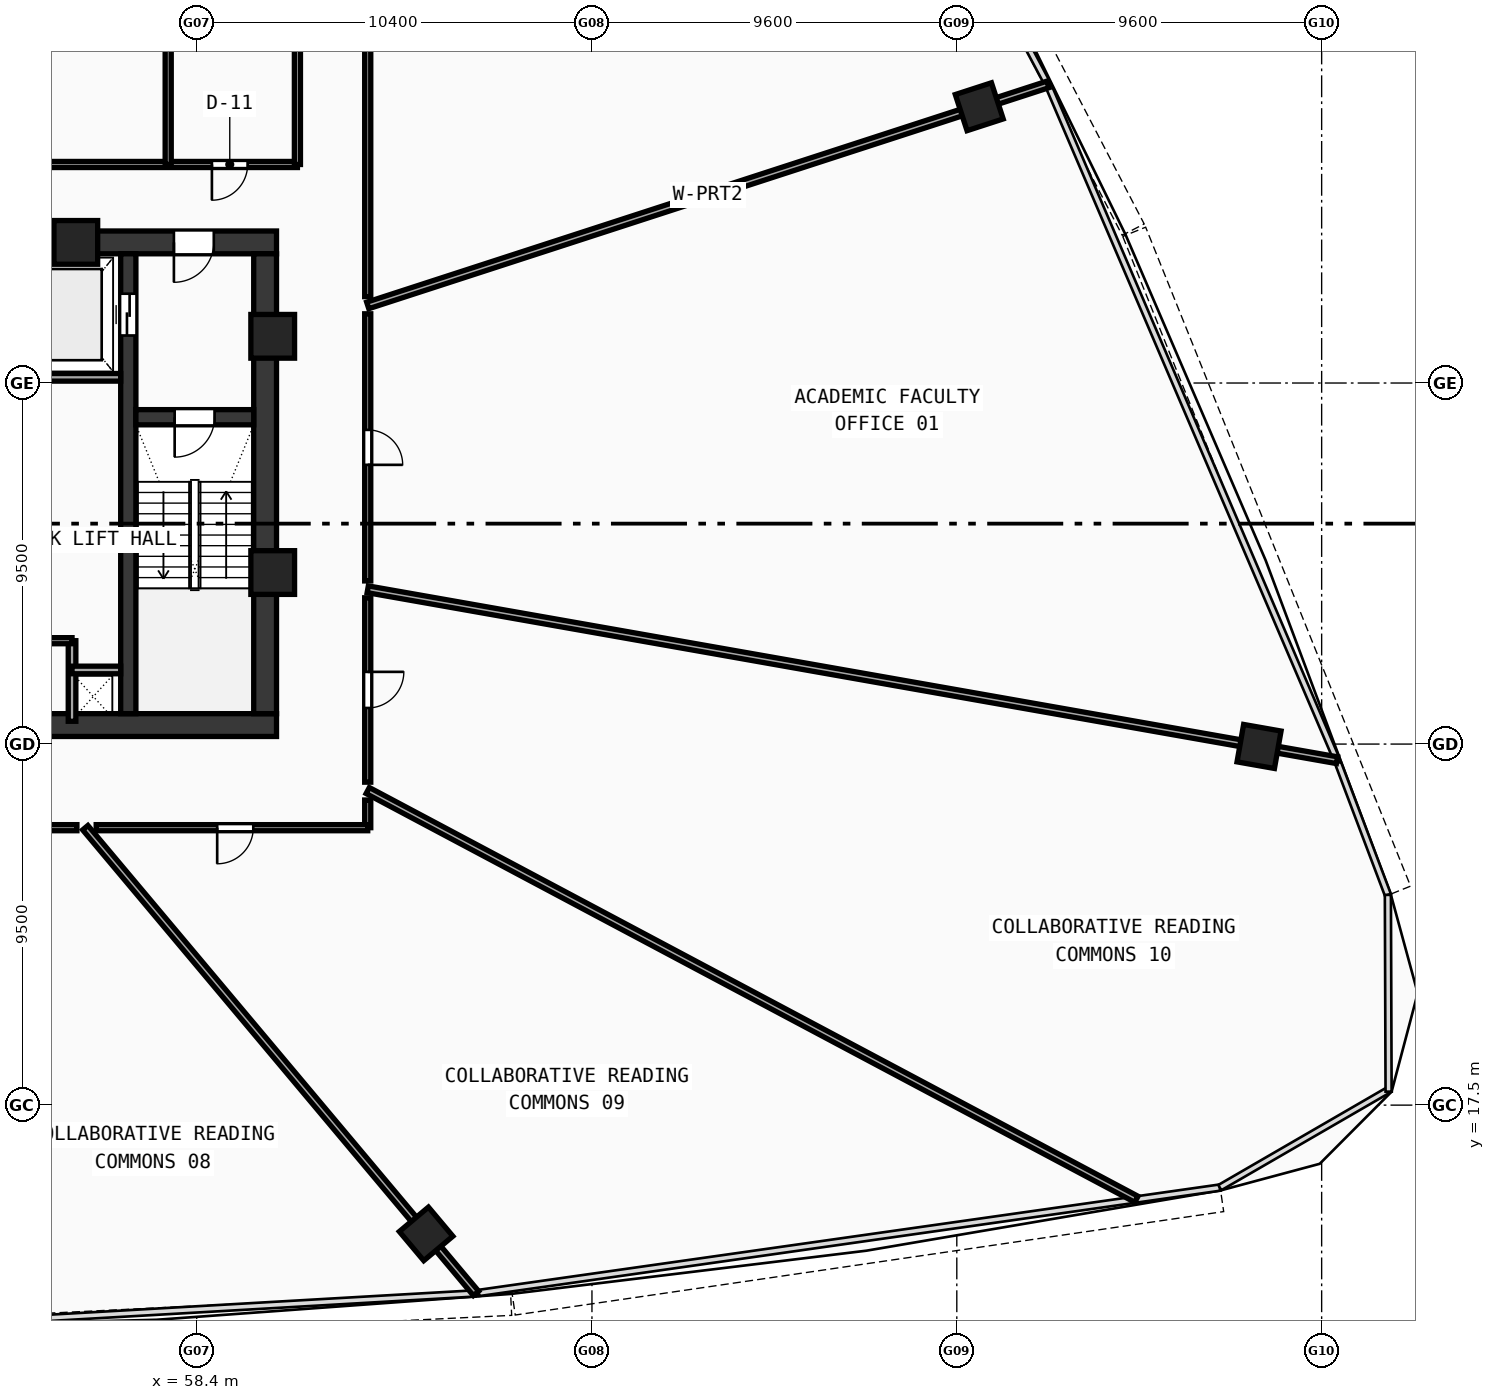
"""IFC4 building model, lengths in metres.
Left out: names, types, materials, properties, quantities, classifications, styles, units other than length and angle.
Written with IfcOpenShell. Run it as: python <this file> out.ifc"""

import sys

from ifc_helpers import new_model, si_unit, direction, frame, frame_2d, origin, origin_with_axes, origin_2d, place, context, subcontext, project, spatial, rectangle, hollow_rectangle, extrude, source, transform, mapped, element, fill, save


model = new_model("IFC4")
c1 = context("Model", 3, precision=1e-05, world=origin(), true_north=direction((0.0, 1.0)))
c2 = subcontext(c1, "Body", "Model", "MODEL_VIEW")
j1 = project(units=[si_unit("LENGTHUNIT", "METRE"), si_unit("PLANEANGLEUNIT", "RADIAN")], contexts=[c1])
p1 = place(None, origin())
s1 = spatial("IfcSite", under=j1, at=p1, CompositionType="ELEMENT")
p2 = place(p1, origin())
s2 = spatial("IfcBuilding", under=s1, at=p2, CompositionType="ELEMENT")
p3 = place(p2, frame((0.0, 0.0, 92.58)))
s3 = spatial("IfcBuildingStorey", under=s2, at=p3, CompositionType="ELEMENT", Elevation=92.58)
p4 = place(p3, frame((35.5, 27.5, 0.0), z_axis=(0.0, 0.0, 1.0), x_axis=(1.0, 0.0, 0.0)))
e1 = element("IfcWall", 1, at=p4, inside=s3, PredefinedType="SHEAR", context=c2, shape_type="SweptSolid", body=[
    extrude(rectangle(XDim=25.0, YDim=0.6, at=frame_2d((12.5, 0.0))), origin(), (0.0, 0.0, 1.0), 3.54),
])
p5 = place(p3, frame((49.2, 40.2, 0.0), z_axis=(0.0, 0.0, 1.0), x_axis=(1.0, 0.0, 0.0)))
e2 = element("IfcWall", 2, at=p5, inside=s3, PredefinedType="SHEAR", context=c2, shape_type="SweptSolid", body=[
    extrude(rectangle(XDim=11.3, YDim=0.6, at=frame_2d((5.65, 0.0))), origin(), (0.0, 0.0, 1.0), 3.54),
])
p6 = place(p5, frame((8.6, 0.0, 0.0)))
e3 = element("IfcOpeningElement", 3, at=p6, cuts=e2, PredefinedType="OPENING", context=c2, shape_type="SweptSolid", body=[
    extrude(rectangle(XDim=1.05, YDim=2.1, at=frame_2d((0.525, 1.05))), frame((0.0, 0.31, 0.0), z_axis=(0.0, -1.0, 0.0), x_axis=(1.0, 0.0, 0.0)), (0.0, 0.0, 1.0), 0.62),
])
p7 = place(p3, frame((60.2, 27.8, 0.0), z_axis=(0.0, 0.0, 1.0), x_axis=(0.0, 1.0, 0.0)))
e4 = element("IfcWall", 4, at=p7, inside=s3, PredefinedType="SHEAR", context=c2, shape_type="SweptSolid", body=[
    extrude(rectangle(XDim=12.1, YDim=0.6, at=frame_2d((6.05, 0.0))), origin(), (0.0, 0.0, 1.0), 3.54),
])
p8 = place(p3, frame((56.6, 27.8, 0.0), z_axis=(0.0, 0.0, 1.0), x_axis=(0.0, 1.0, 0.0)))
e5 = element("IfcWall", 5, at=p8, inside=s3, PredefinedType="SHEAR", context=c2, shape_type="SweptSolid", body=[
    extrude(rectangle(XDim=12.1, YDim=0.4, at=frame_2d((6.05, 0.0))), origin(), (0.0, 0.0, 1.0), 3.54),
])
p9 = place(p8, frame((9.95, 0.0, 0.0)))
e6 = element("IfcOpeningElement", 6, at=p9, cuts=e5, PredefinedType="OPENING", context=c2, shape_type="SweptSolid", body=[
    extrude(rectangle(XDim=1.1, YDim=2.1, at=frame_2d((0.55, 1.05))), frame((0.0, 0.21, 0.0), z_axis=(0.0, -1.0, 0.0), x_axis=(1.0, 0.0, 0.0)), (0.0, 0.0, 1.0), 0.42),
])
p10 = place(p3, frame((56.8, 35.6, 0.0), z_axis=(0.0, 0.0, 1.0), x_axis=(1.0, 0.0, 0.0)))
e7 = element("IfcWall", 7, at=p10, inside=s3, PredefinedType="SHEAR", context=c2, shape_type="SweptSolid", body=[
    extrude(rectangle(XDim=3.1, YDim=0.4, at=frame_2d((1.55, 0.0))), origin(), (0.0, 0.0, 1.0), 3.54),
])
p11 = place(p10, frame((1.02, 0.0, 0.0)))
e8 = element("IfcOpeningElement", 8, at=p11, cuts=e7, PredefinedType="OPENING", context=c2, shape_type="SweptSolid", body=[
    extrude(rectangle(XDim=1.05, YDim=2.1, at=frame_2d((0.525, 1.05))), frame((0.0, 0.21, 0.0), z_axis=(0.0, -1.0, 0.0), x_axis=(1.0, 0.0, 0.0)), (0.0, 0.0, 1.0), 0.42),
])
m1 = source(origin(), c2, "Body", "SweptSolid", [
    extrude(hollow_rectangle(XDim=1.15, YDim=1.15, WallThickness=0.048, at=origin_2d()), origin(), (0.0, 0.0, 1.0), 3.8),
])
for number, where, z_axis, x_axis in (
    (9, (60.4, 31.513, -0.26), (0.0, 0.0, 1.0), (1.0, 0.0, 0.0)),
    (10, (60.4, 37.729, -0.26), (0.0, 0.0, 1.0), (1.0, 0.0, 0.0)),
    (11, (55.219, 40.2, -0.26), (0.0, 0.0, 1.0), (1.0, 0.0, 0.0)),
):
    element("IfcColumn", number, at=place(p3, frame(where, z_axis=z_axis, x_axis=x_axis)), inside=s3, PredefinedType="COLUMN", context=c2, shape_type="MappedRepresentation", body=[
        mapped(m1, transform((0.0, 0.0, 0.0), scale=1.0)),
    ])
m2 = source(origin(), c2, "Body", "SweptSolid", [
    extrude(hollow_rectangle(XDim=1.0, YDim=1.0, WallThickness=0.042, at=origin_2d()), origin(), (0.0, 0.0, 1.0), 3.8),
])
for number, where, z_axis, x_axis in (
    (12, (64.436, 14.112, -0.26), (0.0, 0.0, 1.0), (0.766, 0.643, 0.0)),
    (13, (86.353, 26.938, -0.26), (0.0, 0.0, 1.0), (0.174, 0.985, 0.0)),
    (14, (78.991, 43.77, -0.26), (0.0, 0.0, 1.0), (-0.309, 0.951, 0.0)),
):
    element("IfcColumn", number, at=place(p3, frame(where, z_axis=z_axis, x_axis=x_axis)), inside=s3, PredefinedType="COLUMN", context=c2, shape_type="MappedRepresentation", body=[
        mapped(m2, transform((0.0, 0.0, 0.0), scale=1.0)),
    ])
p12 = place(p3, frame((53.68, 36.65, 0.0), z_axis=(0.0, 0.0, 1.0), x_axis=(1.0, 0.0, 0.0)))
e15 = element("IfcWall", 15, at=p12, inside=s3, PredefinedType="SOLIDWALL", context=c2, shape_type="SweptSolid", body=[
    extrude(rectangle(XDim=2.72, YDim=0.2, at=frame_2d((1.36, 0.0))), origin(), (0.0, 0.0, 1.0), 3.54),
])
p13 = place(p3, frame((55.12, 27.6, 0.0), z_axis=(0.0, 0.0, 1.0), x_axis=(0.0, 1.0, 0.0)))
e16 = element("IfcWall", 16, at=p13, inside=s3, PredefinedType="SOLIDWALL", context=c2, shape_type="SweptSolid", body=[
    extrude(rectangle(XDim=2.12, YDim=0.2, at=frame_2d((1.06, 0.0))), origin(), (0.0, 0.0, 1.0), 3.54),
])
p14 = place(p3, frame((55.12, 28.95, 0.0), z_axis=(0.0, 0.0, 1.0), x_axis=(1.0, 0.0, 0.0)))
e17 = element("IfcWall", 17, at=p14, inside=s3, PredefinedType="SOLIDWALL", context=c2, shape_type="SweptSolid", body=[
    extrude(rectangle(XDim=1.28, YDim=0.2, at=frame_2d((0.64, 0.0))), origin(), (0.0, 0.0, 1.0), 3.54),
])
p15 = place(p3, frame((51.05, 29.72, 0.0), z_axis=(0.0, 0.0, 1.0), x_axis=(1.0, 0.0, 0.0)))
e18 = element("IfcWall", 18, at=p15, inside=s3, PredefinedType="PARTITIONING", context=c2, shape_type="SweptSolid", body=[
    extrude(rectangle(XDim=4.07, YDim=0.16, at=frame_2d((2.035, 0.0))), origin(), (0.0, 0.0, 1.0), 3.54),
])
p16 = place(p15, frame((0.5, 0.0, 0.0)))
e19 = element("IfcOpeningElement", 19, at=p16, cuts=e18, PredefinedType="OPENING", context=c2, shape_type="SweptSolid", body=[
    extrude(rectangle(XDim=0.9, YDim=2.1, at=frame_2d((0.45, 1.05))), frame((0.0, 0.09, 0.0), z_axis=(0.0, -1.0, 0.0), x_axis=(1.0, 0.0, 0.0)), (0.0, 0.0, 1.0), 0.18),
])
p17 = place(p3, frame((45.92, 42.25, 0.0), z_axis=(0.0, 0.0, 1.0), x_axis=(1.0, 0.0, 0.0)))
e20 = element("IfcWall", 20, at=p17, inside=s3, PredefinedType="PARTITIONING", context=c2, shape_type="SweptSolid", body=[
    extrude(rectangle(XDim=15.13, YDim=0.16, at=frame_2d((7.565, 0.0))), origin(), (0.0, 0.0, 1.0), 2.84),
])
p18 = place(p17, frame((2.1, 0.0, 0.0)))
e21 = element("IfcOpeningElement", 21, at=p18, cuts=e20, PredefinedType="OPENING", context=c2, shape_type="SweptSolid", body=[
    extrude(rectangle(XDim=0.92, YDim=2.1, at=frame_2d((0.46, 1.05))), frame((0.0, 0.09, 0.0), z_axis=(0.0, -1.0, 0.0), x_axis=(1.0, 0.0, 0.0)), (0.0, 0.0, 1.0), 0.18),
])
p19 = place(p17, frame((12.88, 0.0, 0.0)))
e22 = element("IfcOpeningElement", 22, at=p19, cuts=e20, PredefinedType="OPENING", context=c2, shape_type="SweptSolid", body=[
    extrude(rectangle(XDim=0.94, YDim=2.1, at=frame_2d((0.47, 1.05))), frame((0.0, 0.09, 0.0), z_axis=(0.0, -1.0, 0.0), x_axis=(1.0, 0.0, 0.0)), (0.0, 0.0, 1.0), 0.18),
])
p20 = place(p3, frame((61.05, 42.25, 0.0), z_axis=(0.0, 0.0, 1.0), x_axis=(0.0, 1.0, 0.0)))
e23 = element("IfcWall", 23, at=p20, inside=s3, PredefinedType="PARTITIONING", context=c2, shape_type="SweptSolid", body=[
    extrude(rectangle(XDim=9.35, YDim=0.16, at=frame_2d((4.675, 0.0))), origin(), (0.0, 0.0, 1.0), 2.84),
])
p21 = place(p3, frame((57.65, 42.25, 0.0), z_axis=(0.0, 0.0, 1.0), x_axis=(0.0, 1.0, 0.0)))
e24 = element("IfcWall", 24, at=p21, inside=s3, PredefinedType="PARTITIONING", context=c2, shape_type="SweptSolid", body=[
    extrude(rectangle(XDim=4.35, YDim=0.16, at=frame_2d((2.175, 0.0))), origin(), (0.0, 0.0, 1.0), 2.84),
])
p22 = place(p3, frame((62.9, 38.541, 0.0), z_axis=(0.0, 0.0, 1.0), x_axis=(0.951056186137, 0.309018010496, 0.0)))
e25 = element("IfcWall", 25, at=p22, inside=s3, PredefinedType="PARTITIONING", context=c2, shape_type="SweptSolid", body=[
    extrude(rectangle(XDim=18.817, YDim=0.18, at=frame_2d((9.409, 0.0))), origin(), (0.0, 0.0, 1.0), 2.84),
])
p23 = place(p3, frame((55.468, 24.8, 0.0), z_axis=(0.0, 0.0, 1.0), x_axis=(0.642790007557, -0.766042431061, 0.0)))
e26 = element("IfcWall", 26, at=p23, inside=s3, PredefinedType="PARTITIONING", context=c2, shape_type="SweptSolid", body=[
    extrude(rectangle(XDim=15.995, YDim=0.18, at=frame_2d((7.998, 0.0))), origin(), (0.0, 0.0, 1.0), 2.84),
])
p24 = place(p3, frame((62.9, 25.778, 0.0), z_axis=(0.0, 0.0, 1.0), x_axis=(0.882949939944, -0.469467148533, 0.0)))
e27 = element("IfcWall", 27, at=p24, inside=s3, PredefinedType="PARTITIONING", context=c2, shape_type="SweptSolid", body=[
    extrude(rectangle(XDim=22.908, YDim=0.18, at=frame_2d((11.454, 0.0))), origin(), (0.0, 0.0, 1.0), 2.84),
])
p25 = place(p3, frame((62.9, 31.073, 0.0), z_axis=(0.0, 0.0, 1.0), x_axis=(0.984807465584, -0.173649807743, 0.0)))
e28 = element("IfcWall", 28, at=p25, inside=s3, PredefinedType="PARTITIONING", context=c2, shape_type="SweptSolid", body=[
    extrude(rectangle(XDim=25.897, YDim=0.18, at=frame_2d((12.949, 0.0))), origin(), (0.0, 0.0, 1.0), 2.84),
])
p26 = place(p3, frame((62.9, 53.45, 0.0), z_axis=(0.0, 0.0, 1.0), x_axis=(0.0, -1.0, 0.0)))
e29 = element("IfcWall", 29, at=p26, inside=s3, PredefinedType="PARTITIONING", context=c2, shape_type="SweptSolid", body=[
    extrude(rectangle(XDim=14.677, YDim=0.16, at=frame_2d((7.339, 0.0))), origin(), (0.0, 0.0, 1.0), 2.84),
])
p27 = place(p26, frame((6.75, 0.0, 0.0)))
e30 = element("IfcOpeningElement", 30, at=p27, cuts=e29, PredefinedType="OPENING", context=c2, shape_type="SweptSolid", body=[
    extrude(rectangle(XDim=0.95, YDim=2.1, at=frame_2d((0.475, 1.05))), frame((0.0, 0.09, 0.0), z_axis=(0.0, -1.0, 0.0), x_axis=(1.0, 0.0, 0.0)), (0.0, 0.0, 1.0), 0.18),
])
p28 = place(p3, frame((62.9, 38.322, 0.0), z_axis=(0.0, 0.0, 1.0), x_axis=(0.0, -1.0, 0.0)))
e31 = element("IfcWall", 31, at=p28, inside=s3, PredefinedType="PARTITIONING", context=c2, shape_type="SweptSolid", body=[
    extrude(rectangle(XDim=7.029, YDim=0.16, at=frame_2d((3.515, 0.0))), origin(), (0.0, 0.0, 1.0), 3.54),
])
p29 = place(p28, frame((3.054, 0.0, 0.0)))
e32 = element("IfcOpeningElement", 32, at=p29, cuts=e31, PredefinedType="OPENING", context=c2, shape_type="SweptSolid", body=[
    extrude(rectangle(XDim=0.92, YDim=2.1, at=frame_2d((0.46, 1.05))), frame((0.0, 0.09, 0.0), z_axis=(0.0, -1.0, 0.0), x_axis=(1.0, 0.0, 0.0)), (0.0, 0.0, 1.0), 0.18),
])
p30 = place(p3, frame((62.9, 30.849, 0.0), z_axis=(0.0, 0.0, 1.0), x_axis=(0.0, -1.0, 0.0)))
e33 = element("IfcWall", 33, at=p30, inside=s3, PredefinedType="PARTITIONING", context=c2, shape_type="SweptSolid", body=[
    extrude(rectangle(XDim=4.852, YDim=0.16, at=frame_2d((2.426, 0.0))), origin(), (0.0, 0.0, 1.0), 3.54),
])
p31 = place(p30, frame((1.949, 0.0, 0.0)))
e34 = element("IfcOpeningElement", 34, at=p31, cuts=e33, PredefinedType="OPENING", context=c2, shape_type="SweptSolid", body=[
    extrude(rectangle(XDim=0.95, YDim=2.1, at=frame_2d((0.475, 1.05))), frame((0.0, 0.09, 0.0), z_axis=(0.0, -1.0, 0.0), x_axis=(1.0, 0.0, 0.0)), (0.0, 0.0, 1.0), 0.18),
])
p32 = place(p3, frame((62.9, 25.528, 0.0), z_axis=(0.0, 0.0, 1.0), x_axis=(0.0, -1.0, 0.0)))
e35 = element("IfcWall", 35, at=p32, inside=s3, PredefinedType="PARTITIONING", context=c2, shape_type="SweptSolid", body=[
    extrude(rectangle(XDim=0.728, YDim=0.16, at=frame_2d((0.364, 0.0))), origin(), (0.0, 0.0, 1.0), 3.54),
])
p33 = place(p3, frame((62.9, 24.8, 0.0), z_axis=(0.0, 0.0, 1.0), x_axis=(-1.0, 0.0, 0.0)))
e36 = element("IfcWall", 36, at=p33, inside=s3, PredefinedType="PARTITIONING", context=c2, shape_type="SweptSolid", body=[
    extrude(rectangle(XDim=7.145, YDim=0.16, at=frame_2d((3.572, 0.0))), origin(), (0.0, 0.0, 1.0), 3.14),
])
p34 = place(p33, frame((3.011, 0.0, 0.0)))
e37 = element("IfcOpeningElement", 37, at=p34, cuts=e36, PredefinedType="OPENING", context=c2, shape_type="SweptSolid", body=[
    extrude(rectangle(XDim=0.95, YDim=2.1, at=frame_2d((0.475, 1.05))), frame((0.0, 0.09, 0.0), z_axis=(0.0, -1.0, 0.0), x_axis=(1.0, 0.0, 0.0)), (0.0, 0.0, 1.0), 0.18),
])
p35 = place(p3, frame((55.248, 24.8, 0.0), z_axis=(0.0, 0.0, 1.0), x_axis=(-1.0, 0.0, 0.0)))
e38 = element("IfcWall", 38, at=p35, inside=s3, PredefinedType="PARTITIONING", context=c2, shape_type="SweptSolid", body=[
    extrude(rectangle(XDim=4.635, YDim=0.16, at=frame_2d((2.318, 0.0))), origin(), (0.0, 0.0, 1.0), 2.84),
])
p36 = place(p35, frame((1.847, 0.0, 0.0)))
e39 = element("IfcOpeningElement", 39, at=p36, cuts=e38, PredefinedType="OPENING", context=c2, shape_type="SweptSolid", body=[
    extrude(rectangle(XDim=0.95, YDim=2.1, at=frame_2d((0.475, 1.05))), frame((0.0, 0.09, 0.0), z_axis=(0.0, -1.0, 0.0), x_axis=(1.0, 0.0, 0.0)), (0.0, 0.0, 1.0), 0.18),
])
m3 = source(origin(), c2, "Body", "SweptSolid", [
    extrude(rectangle(XDim=1.05, YDim=2.1, at=frame_2d((0.525, 1.05))), frame((0.0, 0.025, 0.0), z_axis=(0.0, -1.0, 0.0), x_axis=(1.0, 0.0, 0.0)), (0.0, 0.0, 1.0), 0.05),
])
p37 = place(p11, frame((1.05, 0.0, 0.0), z_axis=(0.0, 0.0, 1.0), x_axis=(-1.0, 0.0, 0.0)))
e40 = element("IfcDoor", 40, at=p37, inside=s3, OperationType="SINGLE_SWING_RIGHT", PredefinedType="DOOR", context=c2, shape_type="MappedRepresentation", body=[
    mapped(m3, transform((0.0, 0.0, 0.0), scale=1.0)),
])
fill(e8, e40)
p38 = place(p6, frame((1.05, 0.0, 0.0), z_axis=(0.0, 0.0, 1.0), x_axis=(-1.0, 0.0, 0.0)))
e41 = element("IfcDoor", 41, at=p38, inside=s3, OperationType="SINGLE_SWING_RIGHT", PredefinedType="DOOR", context=c2, shape_type="MappedRepresentation", body=[
    mapped(m3, transform((0.0, 0.0, 0.0), scale=1.0)),
])
fill(e3, e41)
m4 = source(origin(), c2, "Body", "SweptSolid", [
    extrude(rectangle(XDim=1.1, YDim=2.1, at=frame_2d((0.55, 1.05))), frame((0.0, 0.025, 0.0), z_axis=(0.0, -1.0, 0.0), x_axis=(1.0, 0.0, 0.0)), (0.0, 0.0, 1.0), 0.05),
])
p39 = place(p9, origin_with_axes())
e42 = element("IfcDoor", 42, at=p39, inside=s3, OperationType="DOUBLE_DOOR_SLIDING", PredefinedType="DOOR", context=c2, shape_type="MappedRepresentation", body=[
    mapped(m4, transform((0.0, 0.0, 0.0), scale=1.0)),
])
fill(e6, e42)
m5 = source(origin(), c2, "Body", "SweptSolid", [
    extrude(rectangle(XDim=0.94, YDim=2.1, at=frame_2d((0.47, 1.05))), frame((0.0, 0.025, 0.0), z_axis=(0.0, -1.0, 0.0), x_axis=(1.0, 0.0, 0.0)), (0.0, 0.0, 1.0), 0.05),
])
p40 = place(p19, frame((0.94, 0.0, 0.0), z_axis=(0.0, 0.0, 1.0), x_axis=(-1.0, 0.0, 0.0)))
e43 = element("IfcDoor", 43, at=p40, inside=s3, OperationType="SINGLE_SWING_RIGHT", PredefinedType="DOOR", context=c2, shape_type="MappedRepresentation", body=[
    mapped(m5, transform((0.0, 0.0, 0.0), scale=1.0)),
])
fill(e22, e43)
m6 = source(origin(), c2, "Body", "SweptSolid", [
    extrude(rectangle(XDim=0.92, YDim=2.1, at=frame_2d((0.46, 1.05))), frame((0.0, 0.025, 0.0), z_axis=(0.0, -1.0, 0.0), x_axis=(1.0, 0.0, 0.0)), (0.0, 0.0, 1.0), 0.05),
])
p41 = place(p29, origin_with_axes())
e44 = element("IfcDoor", 44, at=p41, inside=s3, OperationType="SINGLE_SWING_RIGHT", PredefinedType="DOOR", context=c2, shape_type="MappedRepresentation", body=[
    mapped(m6, transform((0.0, 0.0, 0.0), scale=1.0)),
])
fill(e32, e44)
m7 = source(origin(), c2, "Body", "SweptSolid", [
    extrude(rectangle(XDim=0.95, YDim=2.1, at=frame_2d((0.475, 1.05))), frame((0.0, 0.025, 0.0), z_axis=(0.0, -1.0, 0.0), x_axis=(1.0, 0.0, 0.0)), (0.0, 0.0, 1.0), 0.05),
])
p42 = place(p34, origin_with_axes())
e45 = element("IfcDoor", 45, at=p42, inside=s3, OperationType="SINGLE_SWING_RIGHT", PredefinedType="DOOR", context=c2, shape_type="MappedRepresentation", body=[
    mapped(m7, transform((0.0, 0.0, 0.0), scale=1.0)),
])
fill(e37, e45)
p43 = place(p31, origin_with_axes())
e46 = element("IfcDoor", 46, at=p43, inside=s3, OperationType="SINGLE_SWING_LEFT", PredefinedType="DOOR", context=c2, shape_type="MappedRepresentation", body=[
    mapped(m7, transform((0.0, 0.0, 0.0), scale=1.0)),
])
fill(e34, e46)
save(model, sys.argv[1])
